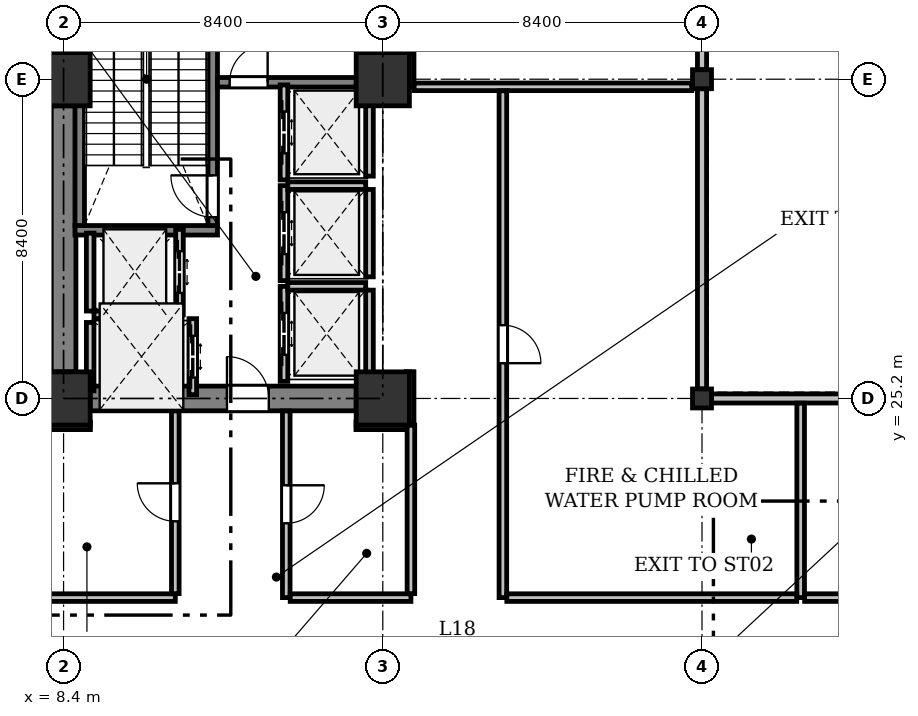
"""IFC4 building model, lengths in metres.
Left out: names, types, materials, properties, quantities, classifications, styles, units other than length and angle.
Written with IfcOpenShell. Run it as: python <this file> out.ifc"""

import sys

from ifc_helpers import new_model, si_unit, direction, frame, frame_2d, origin, origin_2d, place, context, subcontext, project, spatial, rectangle, i_section, extrude, element, fill, save


model = new_model("IFC4")
c1 = context("Model", 3, precision=1e-05, world=origin(), true_north=direction((0.0, 1.0)))
c2 = subcontext(c1, "Body", "Model", "MODEL_VIEW")
j1 = project(units=[si_unit("LENGTHUNIT", "METRE"), si_unit("PLANEANGLEUNIT", "RADIAN")], contexts=[c1])
p1 = place(None, origin())
s1 = spatial("IfcSite", under=j1, at=p1, CompositionType="ELEMENT")
p2 = place(p1, origin())
s2 = spatial("IfcBuilding", under=s1, at=p2, CompositionType="ELEMENT")
p3 = place(p2, frame((0.0, 0.0, 79.4)))
s3 = spatial("IfcBuildingStorey", under=s2, at=p3, CompositionType="ELEMENT", Elevation=79.4)
for number, where, z_axis, x_axis in (
    (1, (8.4, 25.2, 0.0), (0.0, 0.0, 1.0), (1.0, 0.0, 0.0)),
    (2, (8.4, 33.6, 0.0), (0.0, 0.0, 1.0), (1.0, 0.0, 0.0)),
    (3, (16.8, 25.2, 0.0), (0.0, 0.0, 1.0), (1.0, 0.0, 0.0)),
    (4, (16.8, 33.6, 0.0), (0.0, 0.0, 1.0), (1.0, 0.0, 0.0)),
):
    element("IfcColumn", number, at=place(p3, frame(where, z_axis=z_axis, x_axis=x_axis)), inside=s3, PredefinedType="COLUMN", context=c2, shape_type="SweptSolid", body=[
        extrude(rectangle(XDim=1.4, YDim=1.4, at=origin_2d()), origin(), (0.0, 0.0, 1.0), 5.0),
    ])
for number, where, z_axis, x_axis in (
    (5, (25.2, 25.2, 0.0), (0.0, 0.0, 1.0), (1.0, 0.0, 0.0)),
    (6, (25.2, 33.6, 0.0), (0.0, 0.0, 1.0), (1.0, 0.0, 0.0)),
):
    element("IfcColumn", number, at=place(p3, frame(where, z_axis=z_axis, x_axis=x_axis)), inside=s3, PredefinedType="COLUMN", context=c2, shape_type="SweptSolid", body=[
        extrude(i_section(OverallWidth=0.5, OverallDepth=0.5, WebThickness=0.028, FlangeThickness=0.04, at=origin_2d()), origin(), (0.0, 0.0, 1.0), 5.0),
    ])
p4 = place(p3, frame((25.2, 41.75, 0.0), z_axis=(0.0, 0.0, 1.0), x_axis=(0.0, -1.0, 0.0)))
e7 = element("IfcWall", 7, at=p4, inside=s3, PredefinedType="STANDARD", context=c2, shape_type="SweptSolid", body=[
    extrude(rectangle(XDim=7.9, YDim=0.24, at=frame_2d((3.95, 0.0))), origin(), (0.0, 0.0, 1.0), 3.709),
])
p5 = place(p3, frame((25.2, 33.35, 0.0), z_axis=(0.0, 0.0, 1.0), x_axis=(0.0, -1.0, 0.0)))
e8 = element("IfcWall", 8, at=p5, inside=s3, PredefinedType="STANDARD", context=c2, shape_type="SweptSolid", body=[
    extrude(rectangle(XDim=7.9, YDim=0.24, at=frame_2d((3.95, 0.0))), origin(), (0.0, 0.0, 1.0), 3.709),
])
p6 = place(p3, frame((25.45, 25.2, 0.0), z_axis=(0.0, 0.0, 1.0), x_axis=(1.0, 0.0, 0.0)))
e9 = element("IfcWall", 9, at=p6, inside=s3, PredefinedType="STANDARD", context=c2, shape_type="SweptSolid", body=[
    extrude(rectangle(XDim=7.9, YDim=0.24, at=frame_2d((3.95, 0.0))), origin(), (0.0, 0.0, 1.0), 3.825),
])
for number, where, z_axis, x_axis in (
    (10, (8.4, 25.9, 0.0), (0.0, 0.0, 1.0), (0.0, 1.0, 0.0)),
    (11, (8.4, 34.3, 0.0), (0.0, 0.0, 1.0), (0.0, 1.0, 0.0)),
):
    element("IfcWall", number, at=place(p3, frame(where, z_axis=z_axis, x_axis=x_axis)), inside=s3, PredefinedType="SHEAR", context=c2, shape_type="SweptSolid", body=[
        extrude(rectangle(XDim=7.0, YDim=0.65, at=frame_2d((3.5, 0.0))), origin(), (0.0, 0.0, 1.0), 4.725),
    ])
p7 = place(p3, frame((16.8, 34.3, 0.0), z_axis=(0.0, 0.0, 1.0), x_axis=(0.0, 1.0, 0.0)))
e12 = element("IfcWall", 12, at=p7, inside=s3, PredefinedType="SHEAR", context=c2, shape_type="SweptSolid", body=[
    extrude(rectangle(XDim=7.0, YDim=0.65, at=frame_2d((3.5, 0.0))), origin(), (0.0, 0.0, 1.0), 4.725),
])
p8 = place(p7, frame((0.8, 0.0, 0.0)))
e13 = element("IfcOpeningElement", 13, at=p8, cuts=e12, PredefinedType="OPENING", context=c2, shape_type="SweptSolid", body=[
    extrude(rectangle(XDim=1.1, YDim=2.15, at=frame_2d((0.55, 1.075))), frame((0.0, 0.335, 0.0), z_axis=(0.0, -1.0, 0.0), x_axis=(1.0, 0.0, 0.0)), (0.0, 0.0, 1.0), 0.67),
])
p9 = place(p3, frame((9.1, 25.2, 0.0), z_axis=(0.0, 0.0, 1.0), x_axis=(1.0, 0.0, 0.0)))
e14 = element("IfcWall", 14, at=p9, inside=s3, PredefinedType="SHEAR", context=c2, shape_type="SweptSolid", body=[
    extrude(rectangle(XDim=7.0, YDim=0.65, at=frame_2d((3.5, 0.0))), origin(), (0.0, 0.0, 1.0), 4.725),
])
p10 = place(p9, frame((3.6, 0.0, 0.0)))
e15 = element("IfcOpeningElement", 15, at=p10, cuts=e14, PredefinedType="OPENING", context=c2, shape_type="SweptSolid", body=[
    extrude(rectangle(XDim=1.1, YDim=2.15, at=frame_2d((0.55, 1.075))), frame((0.0, 0.335, 0.0), z_axis=(0.0, -1.0, 0.0), x_axis=(1.0, 0.0, 0.0)), (0.0, 0.0, 1.0), 0.67),
])
p11 = place(p3, frame((12.45, 29.625, 0.0), z_axis=(0.0, 0.0, 1.0), x_axis=(-1.0, 0.0, 0.0)))
e16 = element("IfcWall", 16, at=p11, inside=s3, PredefinedType="SHEAR", context=c2, shape_type="SweptSolid", body=[
    extrude(rectangle(XDim=3.75, YDim=0.25, at=frame_2d((1.875, 0.0))), origin(), (0.0, 0.0, 1.0), 4.725),
])
p12 = place(p3, frame((12.325, 29.75, 0.0), z_axis=(0.0, 0.0, 1.0), x_axis=(0.0, 1.0, 0.0)))
e17 = element("IfcWall", 17, at=p12, inside=s3, PredefinedType="SHEAR", context=c2, shape_type="SweptSolid", body=[
    extrude(rectangle(XDim=7.75, YDim=0.25, at=frame_2d((3.875, 0.0))), origin(), (0.0, 0.0, 1.0), 4.725),
])
p13 = place(p12, frame((0.22, 0.0, 0.0)))
e18 = element("IfcOpeningElement", 18, at=p13, cuts=e17, PredefinedType="OPENING", context=c2, shape_type="SweptSolid", body=[
    extrude(rectangle(XDim=1.1, YDim=2.15, at=frame_2d((0.55, 1.075))), frame((0.0, 0.135, 0.0), z_axis=(0.0, -1.0, 0.0), x_axis=(1.0, 0.0, 0.0)), (0.0, 0.0, 1.0), 0.27),
])
p14 = place(p3, frame((8.825, 29.75, 0.0), z_axis=(0.0, 0.0, 1.0), x_axis=(0.0, 1.0, 0.0)))
e19 = element("IfcWall", 19, at=p14, inside=s3, PredefinedType="SHEAR", context=c2, shape_type="SweptSolid", body=[
    extrude(rectangle(XDim=7.75, YDim=0.25, at=frame_2d((3.875, 0.0))), origin(), (0.0, 0.0, 1.0), 4.725),
])
p15 = place(p3, frame((12.45, 33.52, 0.0), z_axis=(0.0, 0.0, 1.0), x_axis=(1.0, 0.0, 0.0)))
e20 = element("IfcWall", 20, at=p15, inside=s3, PredefinedType="SHEAR", context=c2, shape_type="SweptSolid", body=[
    extrude(rectangle(XDim=3.65, YDim=0.25, at=frame_2d((1.825, 0.0))), origin(), (0.0, 0.0, 1.0), 4.725),
])
p16 = place(p15, frame((0.32, 0.0, 0.0)))
e21 = element("IfcOpeningElement", 21, at=p16, cuts=e20, PredefinedType="OPENING", context=c2, shape_type="SweptSolid", body=[
    extrude(rectangle(XDim=1.0, YDim=2.15, at=frame_2d((0.5, 1.075))), frame((0.0, 0.135, 0.0), z_axis=(0.0, -1.0, 0.0), x_axis=(1.0, 0.0, 0.0)), (0.0, 0.0, 1.0), 0.27),
])
p17 = place(p3, frame((11.45, 27.4, 0.0), z_axis=(0.0, 0.0, 1.0), x_axis=(0.0, 1.0, 0.0)))
e22 = element("IfcWall", 22, at=p17, inside=s3, PredefinedType="PARTITIONING", context=c2, shape_type="SweptSolid", body=[
    extrude(rectangle(XDim=2.25, YDim=0.2, at=frame_2d((1.125, 0.0))), origin(), (0.0, 0.0, 1.0), 4.725),
])
p18 = place(p17, frame((0.575, 0.0, 0.0)))
e23 = element("IfcOpeningElement", 23, at=p18, cuts=e22, PredefinedType="OPENING", context=c2, shape_type="SweptSolid", body=[
    extrude(rectangle(XDim=1.1, YDim=2.2, at=frame_2d((0.55, 1.1))), frame((0.0, 0.11, 0.0), z_axis=(0.0, -1.0, 0.0), x_axis=(1.0, 0.0, 0.0)), (0.0, 0.0, 1.0), 0.22),
])
p19 = place(p3, frame((9.1, 27.5, 0.0), z_axis=(0.0, 0.0, 1.0), x_axis=(0.0, 1.0, 0.0)))
e24 = element("IfcWall", 24, at=p19, inside=s3, PredefinedType="PARTITIONING", context=c2, shape_type="SweptSolid", body=[
    extrude(rectangle(XDim=2.05, YDim=0.2, at=frame_2d((1.025, 0.0))), origin(), (0.0, 0.0, 1.0), 4.725),
])
p20 = place(p3, frame((9.2, 27.4, 0.0), z_axis=(0.0, 0.0, 1.0), x_axis=(1.0, 0.0, 0.0)))
e25 = element("IfcWall", 25, at=p20, inside=s3, PredefinedType="PARTITIONING", context=c2, shape_type="SweptSolid", body=[
    extrude(rectangle(XDim=2.15, YDim=0.2, at=frame_2d((1.075, 0.0))), origin(), (0.0, 0.0, 1.0), 4.725),
])
p21 = place(p3, frame((11.8, 25.3, 0.0), z_axis=(0.0, 0.0, 1.0), x_axis=(0.0, 1.0, 0.0)))
e26 = element("IfcWall", 26, at=p21, inside=s3, PredefinedType="PARTITIONING", context=c2, shape_type="SweptSolid", body=[
    extrude(rectangle(XDim=2.0, YDim=0.2, at=frame_2d((1.0, 0.0))), origin(), (0.0, 0.0, 1.0), 4.725),
])
p22 = place(p21, frame((0.45, 0.0, 0.0)))
e27 = element("IfcOpeningElement", 27, at=p22, cuts=e26, PredefinedType="OPENING", context=c2, shape_type="SweptSolid", body=[
    extrude(rectangle(XDim=1.1, YDim=2.2, at=frame_2d((0.55, 1.1))), frame((0.0, 0.11, 0.0), z_axis=(0.0, -1.0, 0.0), x_axis=(1.0, 0.0, 0.0)), (0.0, 0.0, 1.0), 0.22),
])
p23 = place(p3, frame((9.1, 25.4, 0.0), z_axis=(0.0, 0.0, 1.0), x_axis=(0.0, 1.0, 0.0)))
e28 = element("IfcWall", 28, at=p23, inside=s3, PredefinedType="PARTITIONING", context=c2, shape_type="SweptSolid", body=[
    extrude(rectangle(XDim=1.8, YDim=0.2, at=frame_2d((0.9, 0.0))), origin(), (0.0, 0.0, 1.0), 4.725),
])
p24 = place(p3, frame((14.2, 25.65, 0.0), z_axis=(0.0, 0.0, 1.0), x_axis=(0.0, 1.0, 0.0)))
e29 = element("IfcWall", 29, at=p24, inside=s3, PredefinedType="PARTITIONING", context=c2, shape_type="SweptSolid", body=[
    extrude(rectangle(XDim=2.5, YDim=0.2, at=frame_2d((1.25, 0.0))), origin(), (0.0, 0.0, 1.0), 4.725),
])
p25 = place(p24, frame((0.7, 0.0, 0.0)))
e30 = element("IfcOpeningElement", 30, at=p25, cuts=e29, PredefinedType="OPENING", context=c2, shape_type="SweptSolid", body=[
    extrude(rectangle(XDim=1.1, YDim=2.2, at=frame_2d((0.55, 1.1))), frame((0.0, 0.11, 0.0), z_axis=(0.0, -1.0, 0.0), x_axis=(1.0, 0.0, 0.0)), (0.0, 0.0, 1.0), 0.22),
])
p26 = place(p3, frame((16.45, 25.75, 0.0), z_axis=(0.0, 0.0, 1.0), x_axis=(0.0, 1.0, 0.0)))
e31 = element("IfcWall", 31, at=p26, inside=s3, PredefinedType="PARTITIONING", context=c2, shape_type="SweptSolid", body=[
    extrude(rectangle(XDim=2.3, YDim=0.2, at=frame_2d((1.15, 0.0))), origin(), (0.0, 0.0, 1.0), 4.725),
])
p27 = place(p3, frame((14.3, 28.15, 0.0), z_axis=(0.0, 0.0, 1.0), x_axis=(1.0, 0.0, 0.0)))
e32 = element("IfcWall", 32, at=p27, inside=s3, PredefinedType="PARTITIONING", context=c2, shape_type="SweptSolid", body=[
    extrude(rectangle(XDim=2.05, YDim=0.2, at=frame_2d((1.025, 0.0))), origin(), (0.0, 0.0, 1.0), 4.725),
])
p28 = place(p3, frame((14.2, 28.3, 0.0), z_axis=(0.0, 0.0, 1.0), x_axis=(0.0, 1.0, 0.0)))
e33 = element("IfcWall", 33, at=p28, inside=s3, PredefinedType="PARTITIONING", context=c2, shape_type="SweptSolid", body=[
    extrude(rectangle(XDim=2.5, YDim=0.2, at=frame_2d((1.25, 0.0))), origin(), (0.0, 0.0, 1.0), 4.725),
])
p29 = place(p28, frame((0.7, 0.0, 0.0)))
e34 = element("IfcOpeningElement", 34, at=p29, cuts=e33, PredefinedType="OPENING", context=c2, shape_type="SweptSolid", body=[
    extrude(rectangle(XDim=1.1, YDim=2.2, at=frame_2d((0.55, 1.1))), frame((0.0, 0.11, 0.0), z_axis=(0.0, -1.0, 0.0), x_axis=(1.0, 0.0, 0.0)), (0.0, 0.0, 1.0), 0.22),
])
p30 = place(p3, frame((16.45, 28.4, 0.0), z_axis=(0.0, 0.0, 1.0), x_axis=(0.0, 1.0, 0.0)))
e35 = element("IfcWall", 35, at=p30, inside=s3, PredefinedType="PARTITIONING", context=c2, shape_type="SweptSolid", body=[
    extrude(rectangle(XDim=2.3, YDim=0.2, at=frame_2d((1.15, 0.0))), origin(), (0.0, 0.0, 1.0), 4.725),
])
p31 = place(p3, frame((14.3, 30.8, 0.0), z_axis=(0.0, 0.0, 1.0), x_axis=(1.0, 0.0, 0.0)))
e36 = element("IfcWall", 36, at=p31, inside=s3, PredefinedType="PARTITIONING", context=c2, shape_type="SweptSolid", body=[
    extrude(rectangle(XDim=2.05, YDim=0.2, at=frame_2d((1.025, 0.0))), origin(), (0.0, 0.0, 1.0), 4.725),
])
p32 = place(p3, frame((14.2, 30.95, 0.0), z_axis=(0.0, 0.0, 1.0), x_axis=(0.0, 1.0, 0.0)))
e37 = element("IfcWall", 37, at=p32, inside=s3, PredefinedType="PARTITIONING", context=c2, shape_type="SweptSolid", body=[
    extrude(rectangle(XDim=2.5, YDim=0.2, at=frame_2d((1.25, 0.0))), origin(), (0.0, 0.0, 1.0), 4.725),
])
p33 = place(p32, frame((0.7, 0.0, 0.0)))
e38 = element("IfcOpeningElement", 38, at=p33, cuts=e37, PredefinedType="OPENING", context=c2, shape_type="SweptSolid", body=[
    extrude(rectangle(XDim=1.1, YDim=2.2, at=frame_2d((0.55, 1.1))), frame((0.0, 0.11, 0.0), z_axis=(0.0, -1.0, 0.0), x_axis=(1.0, 0.0, 0.0)), (0.0, 0.0, 1.0), 0.22),
])
p34 = place(p3, frame((16.45, 31.05, 0.0), z_axis=(0.0, 0.0, 1.0), x_axis=(0.0, 1.0, 0.0)))
e39 = element("IfcWall", 39, at=p34, inside=s3, PredefinedType="PARTITIONING", context=c2, shape_type="SweptSolid", body=[
    extrude(rectangle(XDim=2.3, YDim=0.2, at=frame_2d((1.15, 0.0))), origin(), (0.0, 0.0, 1.0), 4.725),
])
p35 = place(p3, frame((17.52, 34.3, 0.0), z_axis=(0.0, 0.0, 1.0), x_axis=(0.0, -1.0, 0.0)))
e40 = element("IfcWall", 40, at=p35, inside=s3, PredefinedType="PARTITIONING", context=c2, shape_type="SweptSolid", body=[
    extrude(rectangle(XDim=0.9, YDim=0.2, at=frame_2d((0.45, 0.0))), origin(), (0.0, 0.0, 1.0), 3.825),
])
p36 = place(p3, frame((17.624, 33.4, 0.0), z_axis=(0.0, 0.0, 1.0), x_axis=(1.0, 0.0, 0.0)))
e41 = element("IfcWall", 41, at=p36, inside=s3, PredefinedType="PARTITIONING", context=c2, shape_type="SweptSolid", body=[
    extrude(rectangle(XDim=7.306, YDim=0.2, at=frame_2d((3.653, 0.0))), origin(), (0.0, 0.0, 1.0), 3.825),
])
p37 = place(p3, frame((27.796, 25.076, 0.0), z_axis=(0.0, 0.0, 1.0), x_axis=(0.0, -1.0, 0.0)))
e42 = element("IfcWall", 42, at=p37, inside=s3, PredefinedType="PARTITIONING", context=c2, shape_type="SweptSolid", body=[
    extrude(rectangle(XDim=5.116, YDim=0.2, at=frame_2d((2.558, 0.0))), origin(), (0.0, 0.0, 1.0), 3.825),
])
p38 = place(p3, frame((27.9, 19.96, 0.0), z_axis=(0.0, 0.0, 1.0), x_axis=(1.0, 0.0, 0.0)))
e43 = element("IfcWall", 43, at=p38, inside=s3, PredefinedType="PARTITIONING", context=c2, shape_type="SweptSolid", body=[
    extrude(rectangle(XDim=7.7, YDim=0.2, at=frame_2d((3.85, 0.0))), origin(), (0.0, 0.0, 1.0), 3.709),
])
p39 = place(p3, frame((9.106, 24.481, 0.0), z_axis=(0.0, 0.0, 1.0), x_axis=(-0.999999755233, -0.000699667487, 0.0)))
e44 = element("IfcWall", 44, at=p39, inside=s3, PredefinedType="PARTITIONING", context=c2, shape_type="SweptSolid", body=[
    extrude(rectangle(XDim=1.396, YDim=0.2, at=frame_2d((0.698, 0.0))), origin(), (0.0, 0.0, 1.0), 3.709),
])
p40 = place(p3, frame((7.814, 19.96, 0.0), z_axis=(0.0, 0.0, 1.0), x_axis=(1.0, 0.0, 0.0)))
e45 = element("IfcWall", 45, at=p40, inside=s3, PredefinedType="PARTITIONING", context=c2, shape_type="SweptSolid", body=[
    extrude(rectangle(XDim=3.526, YDim=0.2, at=frame_2d((1.763, 0.0))), origin(), (0.0, 0.0, 1.0), 3.709),
])
p41 = place(p3, frame((11.34, 20.064, 0.0), z_axis=(0.0, 0.0, 1.0), x_axis=(0.0, 1.0, 0.0)))
e46 = element("IfcWall", 46, at=p41, inside=s3, PredefinedType="PARTITIONING", context=c2, shape_type="SweptSolid", body=[
    extrude(rectangle(XDim=4.807, YDim=0.2, at=frame_2d((2.404, 0.0))), origin(), (0.0, 0.0, 1.0), 4.725),
])
p42 = place(p41, frame((1.904, 0.0, 0.0)))
e47 = element("IfcOpeningElement", 47, at=p42, cuts=e46, PredefinedType="OPENING", context=c2, shape_type="SweptSolid", body=[
    extrude(rectangle(XDim=1.0, YDim=2.15, at=frame_2d((0.5, 1.075))), frame((0.0, 0.11, 0.0), z_axis=(0.0, -1.0, 0.0), x_axis=(1.0, 0.0, 0.0)), (0.0, 0.0, 1.0), 0.22),
])
p43 = place(p3, frame((19.96, 33.296, 0.0), z_axis=(0.0, 0.0, 1.0), x_axis=(0.0, -1.0, 0.0)))
e48 = element("IfcWall", 48, at=p43, inside=s3, PredefinedType="PARTITIONING", context=c2, shape_type="SweptSolid", body=[
    extrude(rectangle(XDim=13.336, YDim=0.2, at=frame_2d((6.668, 0.0))), origin(), (0.0, 0.0, 1.0), 3.825),
])
p44 = place(p43, frame((6.168, 0.0, 0.0)))
e49 = element("IfcOpeningElement", 49, at=p44, cuts=e48, PredefinedType="OPENING", context=c2, shape_type="SweptSolid", body=[
    extrude(rectangle(XDim=1.0, YDim=2.15, at=frame_2d((0.5, 1.075))), frame((0.0, 0.11, 0.0), z_axis=(0.0, -1.0, 0.0), x_axis=(1.0, 0.0, 0.0)), (0.0, 0.0, 1.0), 0.22),
])
p45 = place(p3, frame((20.064, 19.96, 0.0), z_axis=(0.0, 0.0, 1.0), x_axis=(1.0, 0.0, 0.0)))
e50 = element("IfcWall", 50, at=p45, inside=s3, PredefinedType="PARTITIONING", context=c2, shape_type="SweptSolid", body=[
    extrude(rectangle(XDim=7.628, YDim=0.2, at=frame_2d((3.814, 0.0))), origin(), (0.0, 0.0, 1.0), 3.709),
])
p46 = place(p3, frame((17.52, 25.904, 0.0), z_axis=(0.0, 0.0, 1.0), x_axis=(0.000347826066, -0.999999939509, 0.0)))
e51 = element("IfcWall", 51, at=p46, inside=s3, PredefinedType="PARTITIONING", context=c2, shape_type="SweptSolid", body=[
    extrude(rectangle(XDim=1.404, YDim=0.2, at=frame_2d((0.702, 0.0))), origin(), (0.0, 0.0, 1.0), 3.825),
])
p47 = place(p3, frame((17.5, 24.48, 0.0), z_axis=(0.0, 0.0, 1.0), x_axis=(-0.999999758706, 0.000694685487, 0.0)))
e52 = element("IfcWall", 52, at=p47, inside=s3, PredefinedType="PARTITIONING", context=c2, shape_type="SweptSolid", body=[
    extrude(rectangle(XDim=1.406, YDim=0.2, at=frame_2d((0.703, 0.0))), origin(), (0.0, 0.0, 1.0), 3.709),
])
p48 = place(p3, frame((14.26, 24.871, 0.0), z_axis=(0.0, 0.0, 1.0), x_axis=(0.0, -1.0, 0.0)))
e53 = element("IfcWall", 53, at=p48, inside=s3, PredefinedType="PARTITIONING", context=c2, shape_type="SweptSolid", body=[
    extrude(rectangle(XDim=4.911, YDim=0.2, at=frame_2d((2.456, 0.0))), origin(), (0.0, 0.0, 1.0), 4.725),
])
p49 = place(p48, frame((1.956, 0.0, 0.0)))
e54 = element("IfcOpeningElement", 54, at=p49, cuts=e53, PredefinedType="OPENING", context=c2, shape_type="SweptSolid", body=[
    extrude(rectangle(XDim=1.0, YDim=2.15, at=frame_2d((0.5, 1.075))), frame((0.0, 0.11, 0.0), z_axis=(0.0, -1.0, 0.0), x_axis=(1.0, 0.0, 0.0)), (0.0, 0.0, 1.0), 0.22),
])
p50 = place(p3, frame((14.364, 19.96, 0.0), z_axis=(0.0, 0.0, 1.0), x_axis=(1.0, 0.0, 0.0)))
e55 = element("IfcWall", 55, at=p50, inside=s3, PredefinedType="PARTITIONING", context=c2, shape_type="SweptSolid", body=[
    extrude(rectangle(XDim=3.176, YDim=0.2, at=frame_2d((1.588, 0.0))), origin(), (0.0, 0.0, 1.0), 3.709),
])
p51 = place(p3, frame((17.54, 20.064, 0.0), z_axis=(0.0, 0.0, 1.0), x_axis=(0.0, 1.0, 0.0)))
e56 = element("IfcWall", 56, at=p51, inside=s3, PredefinedType="PARTITIONING", context=c2, shape_type="SweptSolid", body=[
    extrude(rectangle(XDim=4.436, YDim=0.2, at=frame_2d((2.218, 0.0))), origin(), (0.0, 0.0, 1.0), 4.725),
])
p52 = place(p10, origin())
e57 = element("IfcDoor", 57, at=p52, inside=s3, OperationType="SINGLE_SWING_LEFT", PredefinedType="DOOR", context=c2, shape_type="SweptSolid", body=[
    extrude(rectangle(XDim=1.1, YDim=2.15, at=frame_2d((0.55, 1.075))), frame((0.0, 0.025, 0.0), z_axis=(0.0, -1.0, 0.0), x_axis=(1.0, 0.0, 0.0)), (0.0, 0.0, 1.0), 0.05),
])
fill(e15, e57)
p53 = place(p13, origin())
e58 = element("IfcDoor", 58, at=p53, inside=s3, OperationType="SINGLE_SWING_RIGHT", PredefinedType="DOOR", context=c2, shape_type="SweptSolid", body=[
    extrude(rectangle(XDim=1.1, YDim=2.15, at=frame_2d((0.55, 1.075))), frame((0.0, 0.025, 0.0), z_axis=(0.0, -1.0, 0.0), x_axis=(1.0, 0.0, 0.0)), (0.0, 0.0, 1.0), 0.05),
])
fill(e18, e58)
p54 = place(p16, origin())
e59 = element("IfcDoor", 59, at=p54, inside=s3, OperationType="SINGLE_SWING_RIGHT", PredefinedType="DOOR", context=c2, shape_type="SweptSolid", body=[
    extrude(rectangle(XDim=1.0, YDim=2.15, at=frame_2d((0.5, 1.075))), frame((0.0, 0.025, 0.0), z_axis=(0.0, -1.0, 0.0), x_axis=(1.0, 0.0, 0.0)), (0.0, 0.0, 1.0), 0.05),
])
fill(e21, e59)
p55 = place(p18, origin())
e60 = element("IfcDoor", 60, at=p55, inside=s3, OperationType="DOUBLE_DOOR_SLIDING", PredefinedType="DOOR", context=c2, shape_type="SweptSolid", body=[
    extrude(rectangle(XDim=1.1, YDim=2.2, at=frame_2d((0.55, 1.1))), frame((0.0, 0.025, 0.0), z_axis=(0.0, -1.0, 0.0), x_axis=(1.0, 0.0, 0.0)), (0.0, 0.0, 1.0), 0.05),
])
fill(e23, e60)
p56 = place(p22, origin())
e61 = element("IfcDoor", 61, at=p56, inside=s3, OperationType="DOUBLE_DOOR_SLIDING", PredefinedType="DOOR", context=c2, shape_type="SweptSolid", body=[
    extrude(rectangle(XDim=1.1, YDim=2.2, at=frame_2d((0.55, 1.1))), frame((0.0, 0.025, 0.0), z_axis=(0.0, -1.0, 0.0), x_axis=(1.0, 0.0, 0.0)), (0.0, 0.0, 1.0), 0.05),
])
fill(e27, e61)
p57 = place(p25, origin())
e62 = element("IfcDoor", 62, at=p57, inside=s3, OperationType="DOUBLE_DOOR_SLIDING", PredefinedType="DOOR", context=c2, shape_type="SweptSolid", body=[
    extrude(rectangle(XDim=1.1, YDim=2.2, at=frame_2d((0.55, 1.1))), frame((0.0, 0.025, 0.0), z_axis=(0.0, -1.0, 0.0), x_axis=(1.0, 0.0, 0.0)), (0.0, 0.0, 1.0), 0.05),
])
fill(e30, e62)
p58 = place(p29, origin())
e63 = element("IfcDoor", 63, at=p58, inside=s3, OperationType="DOUBLE_DOOR_SLIDING", PredefinedType="DOOR", context=c2, shape_type="SweptSolid", body=[
    extrude(rectangle(XDim=1.1, YDim=2.2, at=frame_2d((0.55, 1.1))), frame((0.0, 0.025, 0.0), z_axis=(0.0, -1.0, 0.0), x_axis=(1.0, 0.0, 0.0)), (0.0, 0.0, 1.0), 0.05),
])
fill(e34, e63)
p59 = place(p33, origin())
e64 = element("IfcDoor", 64, at=p59, inside=s3, OperationType="DOUBLE_DOOR_SLIDING", PredefinedType="DOOR", context=c2, shape_type="SweptSolid", body=[
    extrude(rectangle(XDim=1.1, YDim=2.2, at=frame_2d((0.55, 1.1))), frame((0.0, 0.025, 0.0), z_axis=(0.0, -1.0, 0.0), x_axis=(1.0, 0.0, 0.0)), (0.0, 0.0, 1.0), 0.05),
])
fill(e38, e64)
p60 = place(p42, origin())
e65 = element("IfcDoor", 65, at=p60, inside=s3, OperationType="SINGLE_SWING_RIGHT", PredefinedType="DOOR", context=c2, shape_type="SweptSolid", body=[
    extrude(rectangle(XDim=1.0, YDim=2.15, at=frame_2d((0.5, 1.075))), frame((0.0, 0.025, 0.0), z_axis=(0.0, -1.0, 0.0), x_axis=(1.0, 0.0, 0.0)), (0.0, 0.0, 1.0), 0.05),
])
fill(e47, e65)
p61 = place(p44, origin())
e66 = element("IfcDoor", 66, at=p61, inside=s3, OperationType="SINGLE_SWING_RIGHT", PredefinedType="DOOR", context=c2, shape_type="SweptSolid", body=[
    extrude(rectangle(XDim=1.0, YDim=2.15, at=frame_2d((0.5, 1.075))), frame((0.0, 0.025, 0.0), z_axis=(0.0, -1.0, 0.0), x_axis=(1.0, 0.0, 0.0)), (0.0, 0.0, 1.0), 0.05),
])
fill(e49, e66)
p62 = place(p49, origin())
e67 = element("IfcDoor", 67, at=p62, inside=s3, OperationType="SINGLE_SWING_LEFT", PredefinedType="DOOR", context=c2, shape_type="SweptSolid", body=[
    extrude(rectangle(XDim=1.0, YDim=2.15, at=frame_2d((0.5, 1.075))), frame((0.0, 0.025, 0.0), z_axis=(0.0, -1.0, 0.0), x_axis=(1.0, 0.0, 0.0)), (0.0, 0.0, 1.0), 0.05),
])
fill(e54, e67)
save(model, sys.argv[1])
